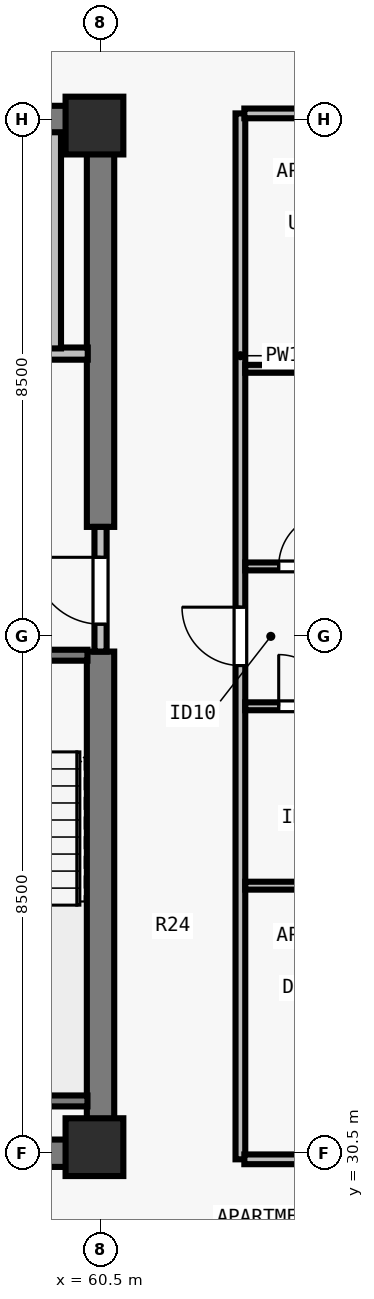
"""IFC4 building model, lengths in metres.
Left out: names, types, materials, properties, quantities, classifications, styles, units other than length and angle.
Written with IfcOpenShell. Run it as: python <this file> out.ifc"""

import sys

from ifc_helpers import new_model, si_unit, direction, frame, frame_2d, origin, origin_2d, place, context, subcontext, project, spatial, rectangle, extrude, element, fill, save


model = new_model("IFC4")
c1 = context("Model", 3, precision=1e-05, world=origin(), true_north=direction((0.0, 1.0)))
c2 = subcontext(c1, "Body", "Model", "MODEL_VIEW")
j1 = project(units=[si_unit("LENGTHUNIT", "METRE"), si_unit("PLANEANGLEUNIT", "RADIAN")], contexts=[c1])
p1 = place(None, origin())
s1 = spatial("IfcSite", under=j1, at=p1, CompositionType="ELEMENT")
p2 = place(p1, origin())
s2 = spatial("IfcBuilding", under=s1, at=p2, CompositionType="ELEMENT")
p3 = place(p2, frame((0.0, 0.0, 216.5)))
s3 = spatial("IfcBuildingStorey", under=s2, at=p3, CompositionType="ELEMENT", Elevation=216.5)
for number, where, z_axis, x_axis in (
    (1, (60.4, 30.6, 0.0), (0.0, 0.0, 1.0), (1.0, 0.0, 0.0)),
    (2, (60.4, 47.4, 0.0), (0.0, 0.0, 1.0), (1.0, 0.0, 0.0)),
):
    element("IfcColumn", number, at=place(p3, frame(where, z_axis=z_axis, x_axis=x_axis)), inside=s3, PredefinedType="COLUMN", context=c2, shape_type="SweptSolid", body=[
        extrude(rectangle(XDim=0.95, YDim=0.95, at=origin_2d()), origin(), (0.0, 0.0, 1.0), 3.5),
    ])
for number, where, z_axis, x_axis in (
    (3, (43.275, 30.5, 0.0), (0.0, 0.0, 1.0), (1.0, 0.0, 0.0)),
    (4, (43.275, 47.5, 0.0), (0.0, 0.0, 1.0), (1.0, 0.0, 0.0)),
):
    element("IfcWall", number, at=place(p3, frame(where, z_axis=z_axis, x_axis=x_axis)), inside=s3, PredefinedType="SHEAR", context=c2, shape_type="SweptSolid", body=[
        extrude(rectangle(XDim=17.45, YDim=0.45, at=frame_2d((8.725, 0.0))), origin(), (0.0, 0.0, 1.0), 3.29),
    ])
p4 = place(p3, frame((60.5, 30.715, 0.0), z_axis=(0.0, 0.0, 1.0), x_axis=(0.0, 1.0, 0.0)))
e5 = element("IfcWall", 5, at=p4, inside=s3, PredefinedType="SHEAR", context=c2, shape_type="SweptSolid", body=[
    extrude(rectangle(XDim=8.035, YDim=0.45, at=frame_2d((4.018, 0.0))), origin(), (0.0, 0.0, 1.0), 3.29),
])
p5 = place(p3, frame((60.5, 40.8, 0.0), z_axis=(0.0, 0.0, 1.0), x_axis=(0.0, 1.0, 0.0)))
e6 = element("IfcWall", 6, at=p5, inside=s3, PredefinedType="SHEAR", context=c2, shape_type="SweptSolid", body=[
    extrude(rectangle(XDim=6.485, YDim=0.45, at=frame_2d((3.242, 0.0))), origin(), (0.0, 0.0, 1.0), 3.29),
])
p6 = place(p3, frame((60.5, 38.75, 0.0), z_axis=(0.0, 0.0, 1.0), x_axis=(0.0, 1.0, 0.0)))
e7 = element("IfcWall", 7, at=p6, inside=s3, PredefinedType="SOLIDWALL", context=c2, shape_type="SweptSolid", body=[
    extrude(rectangle(XDim=2.05, YDim=0.2, at=frame_2d((1.025, 0.0))), origin(), (0.0, 0.0, 1.0), 3.29),
])
p7 = place(p6, frame((0.45, 0.0, 0.0)))
e8 = element("IfcOpeningElement", 8, at=p7, cuts=e7, PredefinedType="OPENING", context=c2, shape_type="SweptSolid", body=[
    extrude(rectangle(XDim=1.1, YDim=2.15, at=frame_2d((0.55, 1.075))), frame((0.0, 0.11, 0.0), z_axis=(0.0, -1.0, 0.0), x_axis=(1.0, 0.0, 0.0)), (0.0, 0.0, 1.0), 0.22),
])
p8 = place(p3, frame((56.735, 43.65, 0.0), z_axis=(0.0, 0.0, 1.0), x_axis=(1.0, 0.0, 0.0)))
e9 = element("IfcWall", 9, at=p8, inside=s3, PredefinedType="SOLIDWALL", context=c2, shape_type="SweptSolid", body=[
    extrude(rectangle(XDim=3.555, YDim=0.2, at=frame_2d((1.777, 0.0))), origin(), (0.0, 0.0, 1.0), 3.29),
])
p9 = place(p8, frame((1.295, 0.0, 0.0)))
e10 = element("IfcOpeningElement", 10, at=p9, cuts=e9, PredefinedType="OPENING", context=c2, shape_type="SweptSolid", body=[
    extrude(rectangle(XDim=1.1, YDim=2.2, at=frame_2d((0.55, 1.1))), frame((0.0, 0.11, 0.0), z_axis=(0.0, -1.0, 0.0), x_axis=(1.0, 0.0, 0.0)), (0.0, 0.0, 1.0), 0.22),
])
p10 = place(p3, frame((59.75, 43.735, 0.0), z_axis=(0.0, 0.0, 1.0), x_axis=(0.0, 1.0, 0.0)))
e11 = element("IfcWall", 11, at=p10, inside=s3, PredefinedType="SOLIDWALL", context=c2, shape_type="SweptSolid", body=[
    extrude(rectangle(XDim=3.555, YDim=0.2, at=frame_2d((1.777, 0.0))), origin(), (0.0, 0.0, 1.0), 3.29),
])
p11 = place(p3, frame((62.8, 30.4, 0.0), z_axis=(0.0, 0.0, 1.0), x_axis=(0.0, 1.0, 0.0)))
e12 = element("IfcWall", 12, at=p11, inside=s3, PredefinedType="PARTITIONING", context=c2, shape_type="SweptSolid", body=[
    extrude(rectangle(XDim=17.2, YDim=0.16, at=frame_2d((8.6, 0.0))), origin(), (0.0, 0.0, 1.0), 3.29),
])
p12 = place(p11, frame((8.12, 0.0, 0.0)))
e13 = element("IfcOpeningElement", 13, at=p12, cuts=e12, PredefinedType="OPENING", context=c2, shape_type="SweptSolid", body=[
    extrude(rectangle(XDim=0.96, YDim=2.18, at=frame_2d((0.48, 1.09))), frame((0.0, 0.09, 0.0), z_axis=(0.0, -1.0, 0.0), x_axis=(1.0, 0.0, 0.0)), (0.0, 0.0, 1.0), 0.18),
])
for number, where, z_axis, x_axis in (
    (14, (62.865, 30.4, 0.0), (0.0, 0.0, 1.0), (1.0, 0.0, 0.0)),
    (15, (62.865, 47.6, 0.0), (0.0, 0.0, 1.0), (1.0, 0.0, 0.0)),
):
    element("IfcWall", number, at=place(p3, frame(where, z_axis=z_axis, x_axis=x_axis)), inside=s3, PredefinedType="PARTITIONING", context=c2, shape_type="SweptSolid", body=[
        extrude(rectangle(XDim=11.33, YDim=0.16, at=frame_2d((5.665, 0.0))), origin(), (0.0, 0.0, 1.0), 3.29),
    ])
p13 = place(p3, frame((62.88, 34.9, 0.0), z_axis=(0.0, 0.0, 1.0), x_axis=(1.0, 0.0, 0.0)))
e16 = element("IfcWall", 16, at=p13, inside=s3, PredefinedType="PLUMBINGWALL", context=c2, shape_type="SweptSolid", body=[
    extrude(rectangle(XDim=2.75, YDim=0.13, at=frame_2d((1.375, 0.0))), origin(), (0.0, 0.0, 1.0), 3.29),
])
p14 = place(p3, frame((62.88, 37.85, 0.0), z_axis=(0.0, 0.0, 1.0), x_axis=(1.0, 0.0, 0.0)))
e17 = element("IfcWall", 17, at=p14, inside=s3, PredefinedType="PLUMBINGWALL", context=c2, shape_type="SweptSolid", body=[
    extrude(rectangle(XDim=2.75, YDim=0.13, at=frame_2d((1.375, 0.0))), origin(), (0.0, 0.0, 1.0), 3.29),
])
p15 = place(p14, frame((0.55, 0.0, 0.0)))
e18 = element("IfcOpeningElement", 18, at=p15, cuts=e17, PredefinedType="OPENING", context=c2, shape_type="SweptSolid", body=[
    extrude(rectangle(XDim=0.85, YDim=2.08, at=frame_2d((0.425, 1.04))), frame((0.0, 0.075, 0.0), z_axis=(0.0, -1.0, 0.0), x_axis=(1.0, 0.0, 0.0)), (0.0, 0.0, 1.0), 0.15),
])
p16 = place(p3, frame((62.88, 43.4, 0.0), z_axis=(0.0, 0.0, 1.0), x_axis=(1.0, 0.0, 0.0)))
e19 = element("IfcWall", 19, at=p16, inside=s3, PredefinedType="PLUMBINGWALL", context=c2, shape_type="SweptSolid", body=[
    extrude(rectangle(XDim=2.75, YDim=0.13, at=frame_2d((1.375, 0.0))), origin(), (0.0, 0.0, 1.0), 3.29),
])
p17 = place(p3, frame((62.88, 40.15, 0.0), z_axis=(0.0, 0.0, 1.0), x_axis=(1.0, 0.0, 0.0)))
e20 = element("IfcWall", 20, at=p17, inside=s3, PredefinedType="PLUMBINGWALL", context=c2, shape_type="SweptSolid", body=[
    extrude(rectangle(XDim=2.75, YDim=0.13, at=frame_2d((1.375, 0.0))), origin(), (0.0, 0.0, 1.0), 3.29),
])
p18 = place(p17, frame((0.55, 0.0, 0.0)))
e21 = element("IfcOpeningElement", 21, at=p18, cuts=e20, PredefinedType="OPENING", context=c2, shape_type="SweptSolid", body=[
    extrude(rectangle(XDim=0.88, YDim=2.1, at=frame_2d((0.44, 1.05))), frame((0.0, 0.075, 0.0), z_axis=(0.0, -1.0, 0.0), x_axis=(1.0, 0.0, 0.0)), (0.0, 0.0, 1.0), 0.15),
])
p19 = place(p3, frame((57.005, 38.69, 0.0), z_axis=(0.0, 0.0, 1.0), x_axis=(1.0, 0.0, 0.0)))
e22 = element("IfcWall", 22, at=p19, inside=s3, PredefinedType="SOLIDWALL", context=c2, shape_type="SweptSolid", body=[
    extrude(rectangle(XDim=3.28, YDim=0.18, at=frame_2d((1.64, 0.0))), origin(), (0.0, 0.0, 1.0), 3.29),
])
p20 = place(p19, frame((1.165, 0.0, 0.0)))
e23 = element("IfcOpeningElement", 23, at=p20, cuts=e22, PredefinedType="OPENING", context=c2, shape_type="SweptSolid", body=[
    extrude(rectangle(XDim=0.95, YDim=2.15, at=frame_2d((0.475, 1.075))), frame((0.0, 0.1, 0.0), z_axis=(0.0, -1.0, 0.0), x_axis=(1.0, 0.0, 0.0)), (0.0, 0.0, 1.0), 0.2),
])
p21 = place(p3, frame((57.005, 31.36, 0.0), z_axis=(0.0, 0.0, 1.0), x_axis=(1.0, 0.0, 0.0)))
e24 = element("IfcWall", 24, at=p21, inside=s3, PredefinedType="SOLIDWALL", context=c2, shape_type="SweptSolid", body=[
    extrude(rectangle(XDim=3.28, YDim=0.18, at=frame_2d((1.64, 0.0))), origin(), (0.0, 0.0, 1.0), 3.29),
])
p22 = place(p7, origin())
e25 = element("IfcDoor", 25, at=p22, inside=s3, OperationType="SINGLE_SWING_RIGHT", PredefinedType="DOOR", context=c2, shape_type="SweptSolid", body=[
    extrude(rectangle(XDim=1.1, YDim=2.15, at=frame_2d((0.55, 1.075))), frame((0.0, 0.025, 0.0), z_axis=(0.0, -1.0, 0.0), x_axis=(1.0, 0.0, 0.0)), (0.0, 0.0, 1.0), 0.05),
])
fill(e8, e25)
p23 = place(p15, origin())
e26 = element("IfcDoor", 26, at=p23, inside=s3, OperationType="SINGLE_SWING_LEFT", PredefinedType="DOOR", context=c2, shape_type="SweptSolid", body=[
    extrude(rectangle(XDim=0.85, YDim=2.08, at=frame_2d((0.425, 1.04))), frame((0.0, 0.025, 0.0), z_axis=(0.0, -1.0, 0.0), x_axis=(1.0, 0.0, 0.0)), (0.0, 0.0, 1.0), 0.05),
])
fill(e18, e26)
p24 = place(p18, origin())
e27 = element("IfcDoor", 27, at=p24, inside=s3, OperationType="SINGLE_SWING_RIGHT", PredefinedType="DOOR", context=c2, shape_type="SweptSolid", body=[
    extrude(rectangle(XDim=0.88, YDim=2.1, at=frame_2d((0.44, 1.05))), frame((0.0, 0.025, 0.0), z_axis=(0.0, -1.0, 0.0), x_axis=(1.0, 0.0, 0.0)), (0.0, 0.0, 1.0), 0.05),
])
fill(e21, e27)
p25 = place(p12, origin())
e28 = element("IfcDoor", 28, at=p25, inside=s3, OperationType="SINGLE_SWING_RIGHT", PredefinedType="DOOR", context=c2, shape_type="SweptSolid", body=[
    extrude(rectangle(XDim=0.96, YDim=2.18, at=frame_2d((0.48, 1.09))), frame((0.0, 0.025, 0.0), z_axis=(0.0, -1.0, 0.0), x_axis=(1.0, 0.0, 0.0)), (0.0, 0.0, 1.0), 0.05),
])
fill(e13, e28)
save(model, sys.argv[1])
